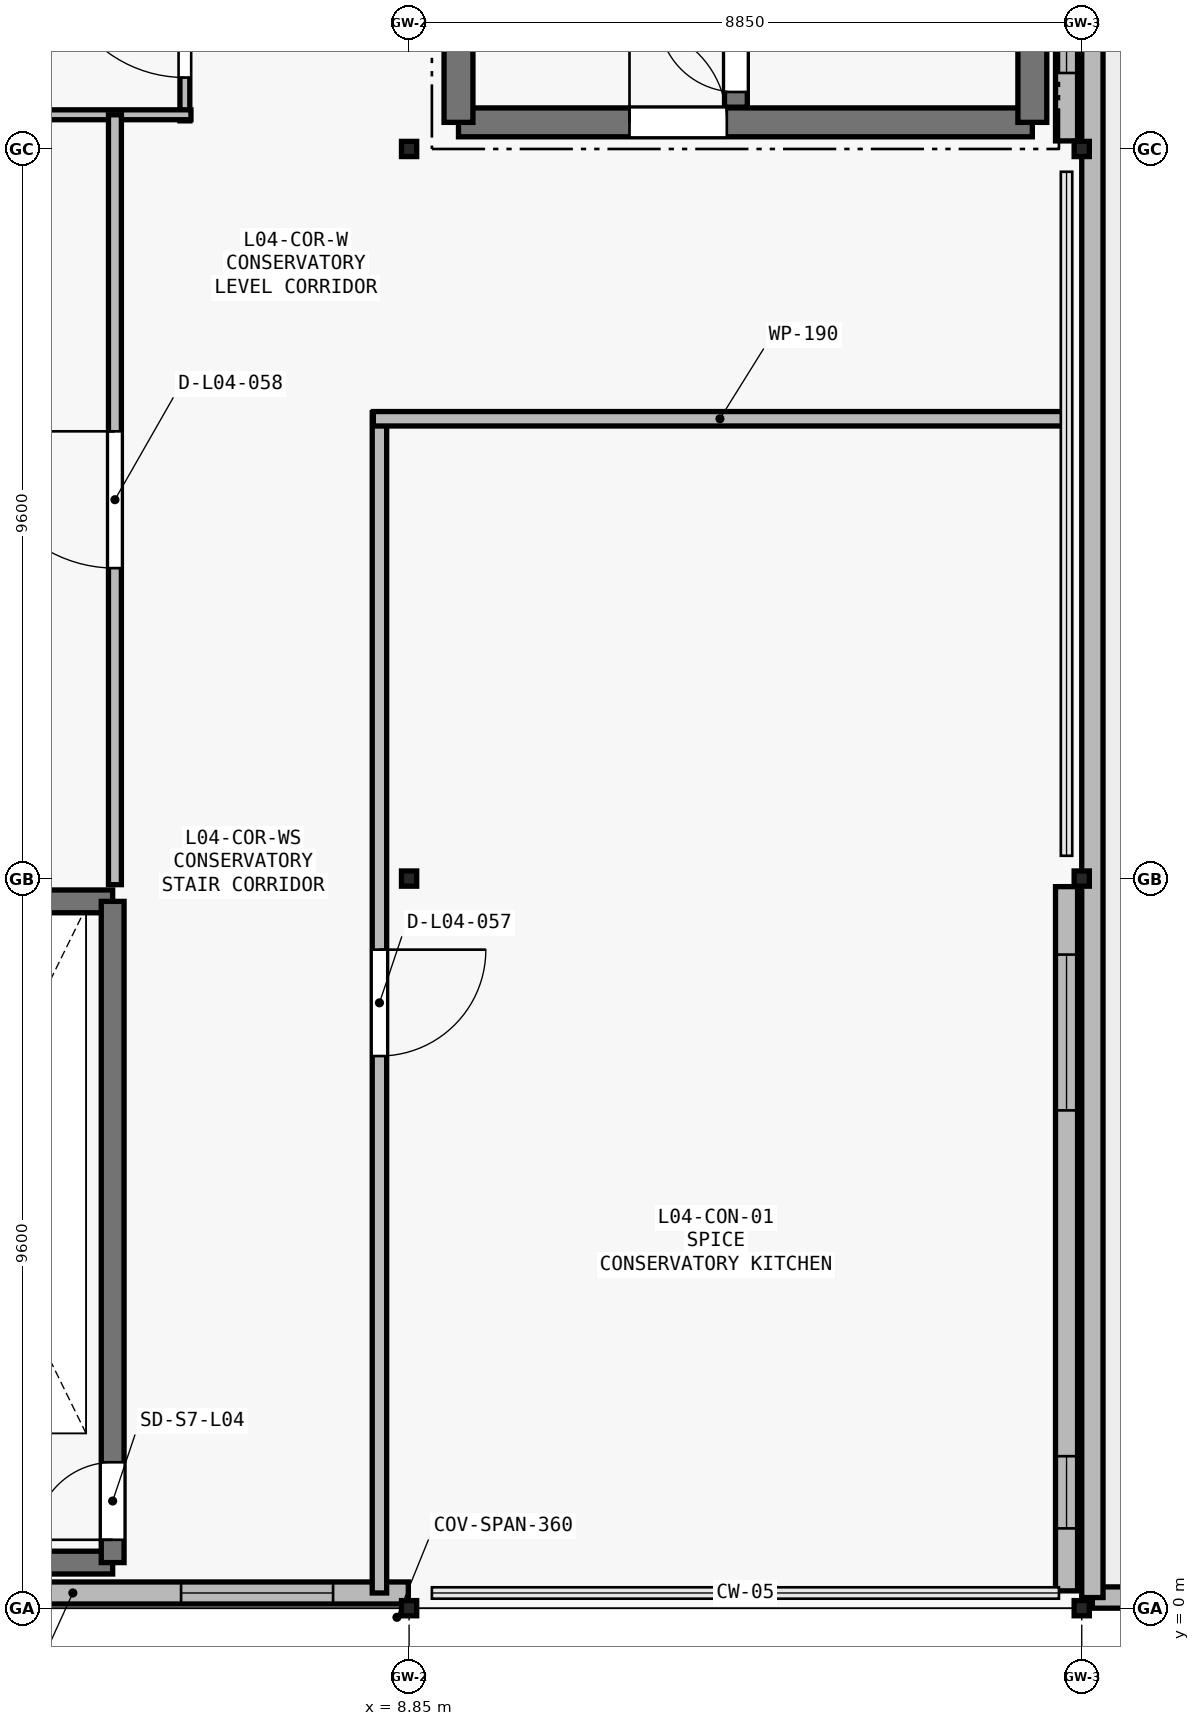
"""IFC4 building model, lengths in metres.
Left out: names, types, materials, properties, quantities, classifications, styles, units other than length and angle.
Written with IfcOpenShell. Run it as: python <this file> out.ifc"""

import sys

from ifc_helpers import new_model, si_unit, direction, frame, frame_2d, origin, origin_2d, place, context, subcontext, project, spatial, rectangle, i_section, extrude, element, fill, save


model = new_model("IFC4")
c1 = context("Model", 3, precision=1e-05, world=origin(), true_north=direction((0.0, 1.0)))
c2 = subcontext(c1, "Body", "Model", "MODEL_VIEW")
j1 = project(units=[si_unit("LENGTHUNIT", "METRE"), si_unit("PLANEANGLEUNIT", "RADIAN")], contexts=[c1])
p1 = place(None, origin())
s1 = spatial("IfcSite", under=j1, at=p1, CompositionType="ELEMENT")
p2 = place(p1, origin())
s2 = spatial("IfcBuilding", under=s1, at=p2, CompositionType="ELEMENT")
p3 = place(p2, frame((0.0, 0.0, 19.2)))
s3 = spatial("IfcBuildingStorey", under=s2, at=p3, CompositionType="ELEMENT", Elevation=19.2)
for number, where, z_axis, x_axis in (
    (1, (8.85, 0.0, 0.0), (0.0, 0.0, 1.0), (1.0, 0.0, 0.0)),
    (2, (8.85, 9.6, 0.0), (0.0, 0.0, 1.0), (1.0, 0.0, 0.0)),
    (3, (8.85, 19.2, 0.0), (0.0, 0.0, 1.0), (1.0, 0.0, 0.0)),
    (4, (17.7, 0.0, 0.0), (0.0, 0.0, 1.0), (1.0, 0.0, 0.0)),
    (5, (17.7, 9.6, 0.0), (0.0, 0.0, 1.0), (1.0, 0.0, 0.0)),
    (6, (17.7, 19.2, 0.0), (0.0, 0.0, 1.0), (1.0, 0.0, 0.0)),
):
    element("IfcColumn", number, at=place(p3, frame(where, z_axis=z_axis, x_axis=x_axis)), inside=s3, PredefinedType="COLUMN", context=c2, shape_type="SweptSolid", body=[
        extrude(i_section(OverallWidth=0.2, OverallDepth=0.2, WebThickness=0.008, FlangeThickness=0.012, FilletRadius=0.013, at=origin_2d()), origin(), (0.0, 0.0, 1.0), 4.2),
    ])
p4 = place(p3, frame((8.84, 0.2, 0.0), z_axis=(0.0, 0.0, 1.0), x_axis=(-1.0, 0.0, 0.0)))
e7 = element("IfcWall", 7, at=p4, inside=s3, PredefinedType="SOLIDWALL", context=c2, shape_type="SweptSolid", body=[
    extrude(rectangle(XDim=8.828, YDim=0.29, at=frame_2d((4.414, 0.0))), origin(), (0.0, 0.0, 1.0), 3.35),
])
p5 = place(p4, frame((0.99, 0.0, 0.95)))
e8 = element("IfcOpeningElement", 8, at=p5, cuts=e7, PredefinedType="OPENING", context=c2, shape_type="SweptSolid", body=[
    extrude(rectangle(XDim=2.0, YDim=2.1, at=frame_2d((1.0, 1.05))), frame((0.0, 0.155, 0.0), z_axis=(0.0, -1.0, 0.0), x_axis=(1.0, 0.0, 0.0)), (0.0, 0.0, 1.0), 0.31),
])
p6 = place(p4, frame((5.59, 0.0, 0.95)))
e9 = element("IfcOpeningElement", 9, at=p6, cuts=e7, PredefinedType="OPENING", context=c2, shape_type="SweptSolid", body=[
    extrude(rectangle(XDim=2.2, YDim=2.1, at=frame_2d((1.1, 1.05))), frame((0.0, 0.155, 0.0), z_axis=(0.0, -1.0, 0.0), x_axis=(1.0, 0.0, 0.0)), (0.0, 0.0, 1.0), 0.31),
])
p7 = place(p3, frame((17.5, 28.694, 0.0), z_axis=(0.0, 0.0, 1.0), x_axis=(0.0, -1.0, 0.0)))
e10 = element("IfcWall", 10, at=p7, inside=s3, PredefinedType="SOLIDWALL", context=c2, shape_type="SweptSolid", body=[
    extrude(rectangle(XDim=9.388, YDim=0.29, at=frame_2d((4.694, 0.0))), origin(), (0.0, 0.0, 1.0), 3.35),
])
p8 = place(p7, frame((0.894, 0.0, 0.95)))
e11 = element("IfcOpeningElement", 11, at=p8, cuts=e10, PredefinedType="OPENING", context=c2, shape_type="SweptSolid", body=[
    extrude(rectangle(XDim=1.45, YDim=1.5, at=frame_2d((0.725, 0.75))), frame((0.0, 0.155, 0.0), z_axis=(0.0, -1.0, 0.0), x_axis=(1.0, 0.0, 0.0)), (0.0, 0.0, 1.0), 0.31),
])
p9 = place(p7, frame((6.744, 0.0, 0.95)))
e12 = element("IfcOpeningElement", 12, at=p9, cuts=e10, PredefinedType="OPENING", context=c2, shape_type="SweptSolid", body=[
    extrude(rectangle(XDim=1.75, YDim=1.5, at=frame_2d((0.875, 0.75))), frame((0.0, 0.155, 0.0), z_axis=(0.0, -1.0, 0.0), x_axis=(1.0, 0.0, 0.0)), (0.0, 0.0, 1.0), 0.31),
])
p10 = place(p3, frame((17.5, 9.494, 0.0), z_axis=(0.0, 0.0, 1.0), x_axis=(0.0, -1.0, 0.0)))
e13 = element("IfcWall", 13, at=p10, inside=s3, PredefinedType="SOLIDWALL", context=c2, shape_type="SweptSolid", body=[
    extrude(rectangle(XDim=9.266, YDim=0.29, at=frame_2d((4.633, 0.0))), origin(), (0.0, 0.0, 1.0), 3.35),
])
p11 = place(p10, frame((0.894, 0.0, 0.95)))
e14 = element("IfcOpeningElement", 14, at=p11, cuts=e13, PredefinedType="OPENING", context=c2, shape_type="SweptSolid", body=[
    extrude(rectangle(XDim=2.05, YDim=1.5, at=frame_2d((1.025, 0.75))), frame((0.0, 0.155, 0.0), z_axis=(0.0, -1.0, 0.0), x_axis=(1.0, 0.0, 0.0)), (0.0, 0.0, 1.0), 0.31),
])
p12 = place(p10, frame((7.494, 0.0, 0.95)))
e15 = element("IfcOpeningElement", 15, at=p12, cuts=e13, PredefinedType="OPENING", context=c2, shape_type="SweptSolid", body=[
    extrude(rectangle(XDim=0.95, YDim=1.65, at=frame_2d((0.475, 0.825))), frame((0.0, 0.155, 0.0), z_axis=(0.0, -1.0, 0.0), x_axis=(1.0, 0.0, 0.0)), (0.0, 0.0, 1.0), 0.31),
])
p13 = place(p3, frame((17.84, 0.14, 0.01), z_axis=(0.0, 0.0, 1.0), x_axis=(1.0, 0.0, 0.0)))
e16 = element("IfcWall", 16, at=p13, inside=s3, PredefinedType="PARAPET", context=c2, shape_type="SweptSolid", body=[
    extrude(rectangle(XDim=8.57, YDim=0.28, at=frame_2d((4.285, 0.0))), origin(), (0.0, 0.0, 1.0), 1.15),
])
p14 = place(p3, frame((17.84, 28.66, 0.01), z_axis=(0.0, 0.0, 1.0), x_axis=(0.0, -1.0, 0.0)))
e17 = element("IfcWall", 17, at=p14, inside=s3, PredefinedType="PARAPET", context=c2, shape_type="SweptSolid", body=[
    extrude(rectangle(XDim=28.52, YDim=0.28, at=frame_2d((14.26, 0.0))), origin(), (0.0, 0.0, 1.0), 1.15),
])
p15 = place(p3, frame((9.5, 19.55, 0.0), z_axis=(0.0, 0.0, 1.0), x_axis=(1.0, 0.0, 0.0)))
e18 = element("IfcWall", 18, at=p15, inside=s3, PredefinedType="SHEAR", context=c2, shape_type="SweptSolid", body=[
    extrude(rectangle(XDim=7.55, YDim=0.38, at=frame_2d((3.775, 0.0))), origin(), (0.0, 0.0, 1.0), 4.2),
])
p16 = place(p15, frame((2.25, 0.0, 0.0)))
e19 = element("IfcOpeningElement", 19, at=p16, cuts=e18, PredefinedType="OPENING", context=c2, shape_type="SweptSolid", body=[
    extrude(rectangle(XDim=1.28, YDim=2.15, at=frame_2d((0.64, 1.075))), frame((0.0, 0.2, 0.0), z_axis=(0.0, -1.0, 0.0), x_axis=(1.0, 0.0, 0.0)), (0.0, 0.0, 1.0), 0.4),
])
for number, where, z_axis, x_axis in (
    (20, (9.5, 28.35, 0.0), (0.0, 0.0, 1.0), (0.0, -1.0, 0.0)),
    (21, (17.05, 19.55, 0.0), (0.0, 0.0, 1.0), (0.0, 1.0, 0.0)),
):
    element("IfcWall", number, at=place(p3, frame(where, z_axis=z_axis, x_axis=x_axis)), inside=s3, PredefinedType="SHEAR", context=c2, shape_type="SweptSolid", body=[
        extrude(rectangle(XDim=8.8, YDim=0.38, at=frame_2d((4.4, 0.0))), origin(), (0.0, 0.0, 1.0), 4.2),
    ])
p17 = place(p3, frame((13.15, 19.75, 0.0), z_axis=(0.0, 0.0, 1.0), x_axis=(0.0, 1.0, 0.0)))
e22 = element("IfcWall", 22, at=p17, inside=s3, PredefinedType="SHEAR", context=c2, shape_type="SweptSolid", body=[
    extrude(rectangle(XDim=8.4, YDim=0.3, at=frame_2d((4.2, 0.0))), origin(), (0.0, 0.0, 1.0), 4.2),
])
p18 = place(p17, frame((0.2, 0.0, 0.0)))
e23 = element("IfcOpeningElement", 23, at=p18, cuts=e22, PredefinedType="OPENING", context=c2, shape_type="SweptSolid", body=[
    extrude(rectangle(XDim=1.02, YDim=2.1, at=frame_2d((0.51, 1.05))), frame((0.0, 0.16, 0.0), z_axis=(0.0, -1.0, 0.0), x_axis=(1.0, 0.0, 0.0)), (0.0, 0.0, 1.0), 0.32),
])
for number, where, z_axis, x_axis in (
    (24, (0.85, 0.6, 0.0), (0.0, 0.0, 1.0), (1.0, 0.0, 0.0)),
    (25, (4.95, 9.3, 0.0), (0.0, 0.0, 1.0), (-1.0, 0.0, 0.0)),
):
    element("IfcWall", number, at=place(p3, frame(where, z_axis=z_axis, x_axis=x_axis)), inside=s3, PredefinedType="SHEAR", context=c2, shape_type="SweptSolid", body=[
        extrude(rectangle(XDim=4.1, YDim=0.3, at=frame_2d((2.05, 0.0))), origin(), (0.0, 0.0, 1.0), 4.2),
    ])
p19 = place(p3, frame((4.95, 0.6, 0.0), z_axis=(0.0, 0.0, 1.0), x_axis=(0.0, 1.0, 0.0)))
e26 = element("IfcWall", 26, at=p19, inside=s3, PredefinedType="SHEAR", context=c2, shape_type="SweptSolid", body=[
    extrude(rectangle(XDim=8.7, YDim=0.3, at=frame_2d((4.35, 0.0))), origin(), (0.0, 0.0, 1.0), 4.2),
])
p20 = place(p19, frame((0.3, 0.0, 0.0)))
e27 = element("IfcOpeningElement", 27, at=p20, cuts=e26, PredefinedType="OPENING", context=c2, shape_type="SweptSolid", body=[
    extrude(rectangle(XDim=1.02, YDim=2.1, at=frame_2d((0.51, 1.05))), frame((0.0, 0.16, 0.0), z_axis=(0.0, -1.0, 0.0), x_axis=(1.0, 0.0, 0.0)), (0.0, 0.0, 1.0), 0.32),
])
p21 = place(p3, frame((5.9, 19.57, 0.0), z_axis=(0.0, 0.0, 1.0), x_axis=(0.0, 1.0, 0.0)))
e28 = element("IfcWall", 28, at=p21, inside=s3, PredefinedType="PARTITIONING", context=c2, shape_type="SweptSolid", body=[
    extrude(rectangle(XDim=2.86, YDim=0.13, at=frame_2d((1.43, 0.0))), origin(), (0.0, 0.0, 1.0), 3.55),
])
p22 = place(p21, frame((0.57, 0.0, 0.0)))
e29 = element("IfcOpeningElement", 29, at=p22, cuts=e28, PredefinedType="OPENING", context=c2, shape_type="SweptSolid", body=[
    extrude(rectangle(XDim=1.72, YDim=2.32, at=frame_2d((0.86, 1.16))), frame((0.0, 0.075, 0.0), z_axis=(0.0, -1.0, 0.0), x_axis=(1.0, 0.0, 0.0)), (0.0, 0.0, 1.0), 0.15),
])
p23 = place(p3, frame((0.2, 19.65, 0.0), z_axis=(0.0, 0.0, 1.0), x_axis=(1.0, 0.0, 0.0)))
e30 = element("IfcWall", 30, at=p23, inside=s3, PredefinedType="PARTITIONING", context=c2, shape_type="SweptSolid", body=[
    extrude(rectangle(XDim=5.78, YDim=0.13, at=frame_2d((2.89, 0.0))), origin(), (0.0, 0.0, 1.0), 3.72),
])
p24 = place(p3, frame((8.46, 15.73, 0.0), z_axis=(0.0, 0.0, 1.0), x_axis=(0.0, -1.0, 0.0)))
e31 = element("IfcWall", 31, at=p24, inside=s3, PredefinedType="PARTITIONING", context=c2, shape_type="SweptSolid", body=[
    extrude(rectangle(XDim=15.53, YDim=0.19, at=frame_2d((7.765, 0.0))), origin(), (0.0, 0.0, 1.0), 3.72),
])
p25 = place(p24, frame((7.065, 0.0, 0.0)))
e32 = element("IfcOpeningElement", 32, at=p25, cuts=e31, PredefinedType="OPENING", context=c2, shape_type="SweptSolid", body=[
    extrude(rectangle(XDim=1.4, YDim=2.38, at=frame_2d((0.7, 1.19))), frame((0.0, 0.105, 0.0), z_axis=(0.0, -1.0, 0.0), x_axis=(1.0, 0.0, 0.0)), (0.0, 0.0, 1.0), 0.21),
])
p26 = place(p3, frame((17.5, 15.65, 0.0), z_axis=(0.0, 0.0, 1.0), x_axis=(-1.0, 0.0, 0.0)))
e33 = element("IfcWall", 33, at=p26, inside=s3, PredefinedType="PARTITIONING", context=c2, shape_type="SweptSolid", body=[
    extrude(rectangle(XDim=9.12, YDim=0.19, at=frame_2d((4.56, 0.0))), origin(), (0.0, 0.0, 1.0), 3.72),
])
p27 = place(p3, frame((4.98, 9.52, 0.0), z_axis=(0.0, 0.0, 1.0), x_axis=(0.0, 1.0, 0.0)))
e34 = element("IfcWall", 34, at=p27, inside=s3, PredefinedType="PARTITIONING", context=c2, shape_type="SweptSolid", body=[
    extrude(rectangle(XDim=10.13, YDim=0.17, at=frame_2d((5.065, 0.0))), origin(), (0.0, 0.0, 1.0), 3.72),
])
p28 = place(p27, frame((4.165, 0.0, 0.0)))
e35 = element("IfcOpeningElement", 35, at=p28, cuts=e34, PredefinedType="OPENING", context=c2, shape_type="SweptSolid", body=[
    extrude(rectangle(XDim=1.8, YDim=2.42, at=frame_2d((0.9, 1.21))), frame((0.0, 0.095, 0.0), z_axis=(0.0, -1.0, 0.0), x_axis=(1.0, 0.0, 0.0)), (0.0, 0.0, 1.0), 0.19),
])
p29 = place(p5, origin())
e36 = element("IfcWindow", 36, at=p29, inside=s3, PartitioningType="SINGLE_PANEL", PredefinedType="WINDOW", context=c2, shape_type="SweptSolid", body=[
    extrude(rectangle(XDim=2.0, YDim=2.1, at=frame_2d((1.0, 1.05))), frame((0.0, 0.03, 0.0), z_axis=(0.0, -1.0, 0.0), x_axis=(1.0, 0.0, 0.0)), (0.0, 0.0, 1.0), 0.06),
])
fill(e8, e36)
p30 = place(p9, origin())
e37 = element("IfcWindow", 37, at=p30, inside=s3, PartitioningType="SINGLE_PANEL", PredefinedType="WINDOW", context=c2, shape_type="SweptSolid", body=[
    extrude(rectangle(XDim=1.75, YDim=1.5, at=frame_2d((0.875, 0.75))), frame((0.0, 0.03, 0.0), z_axis=(0.0, -1.0, 0.0), x_axis=(1.0, 0.0, 0.0)), (0.0, 0.0, 1.0), 0.06),
])
fill(e12, e37)
p31 = place(p11, origin())
e38 = element("IfcWindow", 38, at=p31, inside=s3, PartitioningType="SINGLE_PANEL", PredefinedType="WINDOW", context=c2, shape_type="SweptSolid", body=[
    extrude(rectangle(XDim=2.05, YDim=1.5, at=frame_2d((1.025, 0.75))), frame((0.0, 0.03, 0.0), z_axis=(0.0, -1.0, 0.0), x_axis=(1.0, 0.0, 0.0)), (0.0, 0.0, 1.0), 0.06),
])
fill(e14, e38)
p32 = place(p12, origin())
e39 = element("IfcWindow", 39, at=p32, inside=s3, PartitioningType="SINGLE_PANEL", PredefinedType="WINDOW", context=c2, shape_type="SweptSolid", body=[
    extrude(rectangle(XDim=0.95, YDim=1.65, at=frame_2d((0.475, 0.825))), frame((0.0, 0.03, 0.0), z_axis=(0.0, -1.0, 0.0), x_axis=(1.0, 0.0, 0.0)), (0.0, 0.0, 1.0), 0.06),
])
fill(e15, e39)
p33 = place(p16, origin())
e40 = element("IfcDoor", 40, at=p33, inside=s3, OperationType="SINGLE_SWING_LEFT", PredefinedType="DOOR", context=c2, shape_type="SweptSolid", body=[
    extrude(rectangle(XDim=1.28, YDim=2.15, at=frame_2d((0.64, 1.075))), frame((0.0, 0.025, 0.0), z_axis=(0.0, -1.0, 0.0), x_axis=(1.0, 0.0, 0.0)), (0.0, 0.0, 1.0), 0.05),
])
fill(e19, e40)
p34 = place(p18, origin())
e41 = element("IfcDoor", 41, at=p34, inside=s3, OperationType="SINGLE_SWING_RIGHT", PredefinedType="DOOR", context=c2, shape_type="SweptSolid", body=[
    extrude(rectangle(XDim=1.02, YDim=2.1, at=frame_2d((0.51, 1.05))), frame((0.0, 0.025, 0.0), z_axis=(0.0, -1.0, 0.0), x_axis=(1.0, 0.0, 0.0)), (0.0, 0.0, 1.0), 0.05),
])
fill(e23, e41)
p35 = place(p20, origin())
e42 = element("IfcDoor", 42, at=p35, inside=s3, OperationType="SINGLE_SWING_LEFT", PredefinedType="DOOR", context=c2, shape_type="SweptSolid", body=[
    extrude(rectangle(XDim=1.02, YDim=2.1, at=frame_2d((0.51, 1.05))), frame((0.0, 0.025, 0.0), z_axis=(0.0, -1.0, 0.0), x_axis=(1.0, 0.0, 0.0)), (0.0, 0.0, 1.0), 0.05),
])
fill(e27, e42)
p36 = place(p22, origin())
e43 = element("IfcDoor", 43, at=p36, inside=s3, OperationType="SINGLE_SWING_RIGHT", PredefinedType="DOOR", context=c2, shape_type="SweptSolid", body=[
    extrude(rectangle(XDim=1.72, YDim=2.32, at=frame_2d((0.86, 1.16))), frame((0.0, 0.025, 0.0), z_axis=(0.0, -1.0, 0.0), x_axis=(1.0, 0.0, 0.0)), (0.0, 0.0, 1.0), 0.05),
])
fill(e29, e43)
p37 = place(p25, origin())
e44 = element("IfcDoor", 44, at=p37, inside=s3, OperationType="SINGLE_SWING_LEFT", PredefinedType="DOOR", context=c2, shape_type="SweptSolid", body=[
    extrude(rectangle(XDim=1.4, YDim=2.38, at=frame_2d((0.7, 1.19))), frame((0.0, 0.025, 0.0), z_axis=(0.0, -1.0, 0.0), x_axis=(1.0, 0.0, 0.0)), (0.0, 0.0, 1.0), 0.05),
])
fill(e32, e44)
p38 = place(p28, origin())
e45 = element("IfcDoor", 45, at=p38, inside=s3, OperationType="SINGLE_SWING_RIGHT", PredefinedType="DOOR", context=c2, shape_type="SweptSolid", body=[
    extrude(rectangle(XDim=1.8, YDim=2.42, at=frame_2d((0.9, 1.21))), frame((0.0, 0.025, 0.0), z_axis=(0.0, -1.0, 0.0), x_axis=(1.0, 0.0, 0.0)), (0.0, 0.0, 1.0), 0.05),
])
fill(e35, e45)
save(model, sys.argv[1])
